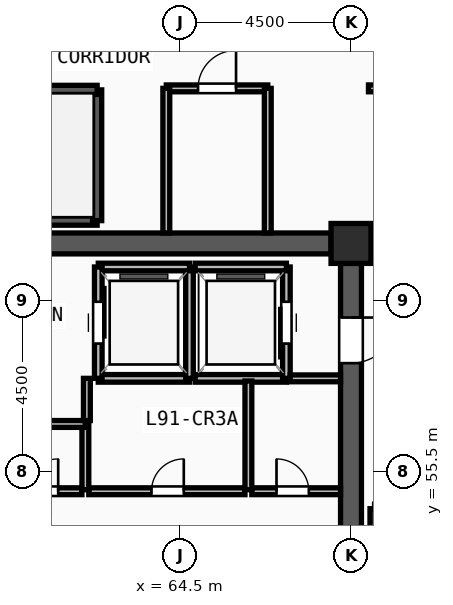
"""IFC4 building model, lengths in metres.
Left out: names, types, materials, properties, quantities, classifications, styles, units other than length and angle.
Written with IfcOpenShell. Run it as: python <this file> out.ifc"""

import sys

from ifc_helpers import new_model, si_unit, direction, frame, frame_2d, origin, origin_2d, place, context, subcontext, project, spatial, rectangle, extrude, source, transform, mapped, element, fill, save


model = new_model("IFC4")
c1 = context("Model", 3, precision=1e-05, world=origin(), true_north=direction((0.0, 1.0)))
c2 = subcontext(c1, "Body", "Model", "MODEL_VIEW")
j1 = project(units=[si_unit("LENGTHUNIT", "METRE"), si_unit("PLANEANGLEUNIT", "RADIAN")], contexts=[c1])
p1 = place(None, origin())
s1 = spatial("IfcSite", under=j1, at=p1, CompositionType="ELEMENT")
p2 = place(p1, origin())
s2 = spatial("IfcBuilding", under=s1, at=p2, CompositionType="ELEMENT")
p3 = place(p2, frame((0.0, 0.0, 351.0)))
s3 = spatial("IfcBuildingStorey", under=s2, at=p3, CompositionType="ELEMENT", Elevation=351.0)
m1 = source(origin(), c2, "Body", "SweptSolid", [
    extrude(rectangle(XDim=1.05, YDim=1.05, at=origin_2d()), origin(), (0.0, 0.0, 1.0), 4.8),
])
p4 = place(p3, frame((69.0, 61.5, 0.0), z_axis=(0.0, 0.0, 1.0), x_axis=(1.0, 0.0, 0.0)))
e1 = element("IfcColumn", 1, at=p4, inside=s3, PredefinedType="COLUMN", context=c2, shape_type="MappedRepresentation", body=[
    mapped(m1, transform((0.0, 0.0, 0.0), x_axis=(1.0, 0.0, 0.0), y_axis=(0.0, 1.0, 0.0), z_axis=(0.0, 0.0, 1.0), scale=1.0)),
])
p5 = place(p3, frame((60.525, 61.5, 0.0), z_axis=(0.0, 0.0, 1.0), x_axis=(1.0, 0.0, 0.0)))
e2 = element("IfcWall", 2, at=p5, inside=s3, PredefinedType="SHEAR", context=c2, shape_type="SweptSolid", body=[
    extrude(rectangle(XDim=7.95, YDim=0.55, at=frame_2d((3.975, 0.0))), origin(), (0.0, 0.0, 1.0), 4.52),
])
p6 = place(p3, frame((69.0, 60.975, 0.0), z_axis=(0.0, 0.0, 1.0), x_axis=(0.0, -1.0, 0.0)))
e3 = element("IfcWall", 3, at=p6, inside=s3, PredefinedType="SHEAR", context=c2, shape_type="SweptSolid", body=[
    extrude(rectangle(XDim=13.95, YDim=0.55, at=frame_2d((6.975, 0.0))), origin(), (0.0, 0.0, 1.0), 4.52),
])
m2 = source(origin(), c2, "Body", "SweptSolid", [
    extrude(rectangle(XDim=1.2, YDim=2.2, at=frame_2d((0.6, 1.1))), frame((0.0, 0.285, 0.0), z_axis=(0.0, -1.0, 0.0), x_axis=(1.0, 0.0, 0.0)), (0.0, 0.0, 1.0), 0.57),
])
p7 = place(p6, frame((1.425, 0.0, 0.0)))
e4 = element("IfcOpeningElement", 4, at=p7, cuts=e3, PredefinedType="OPENING", context=c2, shape_type="MappedRepresentation", body=[
    mapped(m2, transform((0.0, 0.0, 0.0), x_axis=(1.0, 0.0, 0.0), y_axis=(0.0, 1.0, 0.0), z_axis=(0.0, 0.0, 1.0), scale=1.0)),
])
for number, where, z_axis, x_axis in (
    (5, (69.62, 54.52, 0.0), (0.0, 0.0, 1.0), (0.0, -1.0, 0.0)),
    (6, (54.5, 62.1, 0.0), (0.0, 0.0, 1.0), (1.0, 0.0, 0.0)),
):
    element("IfcWall", number, at=place(p3, frame(where, z_axis=z_axis, x_axis=x_axis)), inside=s3, PredefinedType="SOLIDWALL", context=c2, shape_type="SweptSolid", body=[
        extrude(rectangle(XDim=7.82, YDim=0.24, at=frame_2d((3.91, 0.0))), origin(), (0.0, 0.0, 1.0), 4.52),
    ])
p8 = place(p3, frame((62.32, 62.1, 0.0), z_axis=(0.0, 0.0, 1.0), x_axis=(0.0, 1.0, 0.0)))
e7 = element("IfcWall", 7, at=p8, inside=s3, PredefinedType="SOLIDWALL", context=c2, shape_type="SweptSolid", body=[
    extrude(rectangle(XDim=3.44, YDim=0.24, at=frame_2d((1.72, 0.0))), origin(), (0.0, 0.0, 1.0), 4.52),
])
p9 = place(p3, frame((62.32, 65.54, 0.0), z_axis=(0.0, 0.0, 1.0), x_axis=(-1.0, 0.0, 0.0)))
e8 = element("IfcWall", 8, at=p9, inside=s3, PredefinedType="SOLIDWALL", context=c2, shape_type="SweptSolid", body=[
    extrude(rectangle(XDim=7.82, YDim=0.24, at=frame_2d((3.91, 0.0))), origin(), (0.0, 0.0, 1.0), 4.52),
])
m3 = source(origin(), c2, "Body", "SweptSolid", [
    extrude(rectangle(XDim=1.2, YDim=2.2, at=frame_2d((0.6, 1.1))), frame((0.0, 0.13, 0.0), z_axis=(0.0, -1.0, 0.0), x_axis=(1.0, 0.0, 0.0)), (0.0, 0.0, 1.0), 0.26),
])
p10 = place(p9, frame((6.3, 0.0, 0.0)))
e9 = element("IfcOpeningElement", 9, at=p10, cuts=e8, PredefinedType="OPENING", context=c2, shape_type="MappedRepresentation", body=[
    mapped(m3, transform((0.0, 0.0, 0.0), x_axis=(1.0, 0.0, 0.0), y_axis=(0.0, 1.0, 0.0), z_axis=(0.0, 0.0, 1.0), scale=1.0)),
])
p11 = place(p3, frame((62.35, 57.95, 0.0), z_axis=(0.0, 0.0, 1.0), x_axis=(1.0, 0.0, 0.0)))
e10 = element("IfcWall", 10, at=p11, inside=s3, PredefinedType="SOLIDWALL", context=c2, shape_type="SweptSolid", body=[
    extrude(rectangle(XDim=2.4, YDim=0.2, at=frame_2d((1.2, 0.0))), origin(), (0.0, 0.0, 1.0), 4.52),
])
p12 = place(p3, frame((64.75, 57.95, 0.0), z_axis=(0.0, 0.0, 1.0), x_axis=(0.0, 1.0, 0.0)))
e11 = element("IfcWall", 11, at=p12, inside=s3, PredefinedType="SOLIDWALL", context=c2, shape_type="SweptSolid", body=[
    extrude(rectangle(XDim=2.93, YDim=0.2, at=frame_2d((1.465, 0.0))), origin(), (0.0, 0.0, 1.0), 4.52),
])
p13 = place(p3, frame((64.75, 60.88, 0.0), z_axis=(0.0, 0.0, 1.0), x_axis=(-1.0, 0.0, 0.0)))
e12 = element("IfcWall", 12, at=p13, inside=s3, PredefinedType="SOLIDWALL", context=c2, shape_type="SweptSolid", body=[
    extrude(rectangle(XDim=2.4, YDim=0.2, at=frame_2d((1.2, 0.0))), origin(), (0.0, 0.0, 1.0), 4.52),
])
p14 = place(p3, frame((62.35, 60.88, 0.0), z_axis=(0.0, 0.0, 1.0), x_axis=(0.0, -1.0, 0.0)))
e13 = element("IfcWall", 13, at=p14, inside=s3, PredefinedType="SOLIDWALL", context=c2, shape_type="SweptSolid", body=[
    extrude(rectangle(XDim=2.93, YDim=0.2, at=frame_2d((1.465, 0.0))), origin(), (0.0, 0.0, 1.0), 4.52),
])
m4 = source(origin(), c2, "Body", "SweptSolid", [
    extrude(rectangle(XDim=1.1, YDim=2.2, at=frame_2d((0.55, 1.1))), frame((0.0, 0.11, 0.0), z_axis=(0.0, -1.0, 0.0), x_axis=(1.0, 0.0, 0.0)), (0.0, 0.0, 1.0), 0.22),
])
p15 = place(p14, frame((0.915, 0.0, 0.0)))
e14 = element("IfcOpeningElement", 14, at=p15, cuts=e13, PredefinedType="OPENING", context=c2, shape_type="MappedRepresentation", body=[
    mapped(m4, transform((0.0, 0.0, 0.0), x_axis=(1.0, 0.0, 0.0), y_axis=(0.0, 1.0, 0.0), z_axis=(0.0, 0.0, 1.0), scale=1.0)),
])
p16 = place(p3, frame((64.9, 57.95, 0.0), z_axis=(0.0, 0.0, 1.0), x_axis=(1.0, 0.0, 0.0)))
e15 = element("IfcWall", 15, at=p16, inside=s3, PredefinedType="SOLIDWALL", context=c2, shape_type="SweptSolid", body=[
    extrude(rectangle(XDim=2.4, YDim=0.2, at=frame_2d((1.2, 0.0))), origin(), (0.0, 0.0, 1.0), 4.52),
])
p17 = place(p3, frame((67.3, 57.95, 0.0), z_axis=(0.0, 0.0, 1.0), x_axis=(0.0, 1.0, 0.0)))
e16 = element("IfcWall", 16, at=p17, inside=s3, PredefinedType="SOLIDWALL", context=c2, shape_type="SweptSolid", body=[
    extrude(rectangle(XDim=2.93, YDim=0.2, at=frame_2d((1.465, 0.0))), origin(), (0.0, 0.0, 1.0), 4.52),
])
p18 = place(p17, frame((0.915, 0.0, 0.0)))
e17 = element("IfcOpeningElement", 17, at=p18, cuts=e16, PredefinedType="OPENING", context=c2, shape_type="MappedRepresentation", body=[
    mapped(m4, transform((0.0, 0.0, 0.0), x_axis=(1.0, 0.0, 0.0), y_axis=(0.0, 1.0, 0.0), z_axis=(0.0, 0.0, 1.0), scale=1.0)),
])
p19 = place(p3, frame((67.3, 60.88, 0.0), z_axis=(0.0, 0.0, 1.0), x_axis=(-1.0, 0.0, 0.0)))
e18 = element("IfcWall", 18, at=p19, inside=s3, PredefinedType="SOLIDWALL", context=c2, shape_type="SweptSolid", body=[
    extrude(rectangle(XDim=2.4, YDim=0.2, at=frame_2d((1.2, 0.0))), origin(), (0.0, 0.0, 1.0), 4.52),
])
p20 = place(p3, frame((62.1, 54.98, 0.0), z_axis=(0.0, 0.0, 1.0), x_axis=(1.0, 0.0, 0.0)))
e19 = element("IfcWall", 19, at=p20, inside=s3, PredefinedType="PARTITIONING", context=c2, shape_type="SweptSolid", body=[
    extrude(rectangle(XDim=4.11, YDim=0.18, at=frame_2d((2.055, 0.0))), origin(), (0.0, 0.0, 1.0), 4.52),
])
m5 = source(origin(), c2, "Body", "SweptSolid", [
    extrude(rectangle(XDim=0.85, YDim=2.1, at=frame_2d((0.425, 1.05))), frame((0.0, 0.1, 0.0), z_axis=(0.0, -1.0, 0.0), x_axis=(1.0, 0.0, 0.0)), (0.0, 0.0, 1.0), 0.2),
])
p21 = place(p20, frame((1.65, 0.0, 0.0)))
e20 = element("IfcOpeningElement", 20, at=p21, cuts=e19, PredefinedType="OPENING", context=c2, shape_type="MappedRepresentation", body=[
    mapped(m5, transform((0.0, 0.0, 0.0), x_axis=(1.0, 0.0, 0.0), y_axis=(0.0, 1.0, 0.0), z_axis=(0.0, 0.0, 1.0), scale=1.0)),
])
p22 = place(p3, frame((66.39, 54.98, 0.0), z_axis=(0.0, 0.0, 1.0), x_axis=(1.0, 0.0, 0.0)))
e21 = element("IfcWall", 21, at=p22, inside=s3, PredefinedType="PARTITIONING", context=c2, shape_type="SweptSolid", body=[
    extrude(rectangle(XDim=2.335, YDim=0.18, at=frame_2d((1.167, 0.0))), origin(), (0.0, 0.0, 1.0), 4.52),
])
p23 = place(p22, frame((0.65, 0.0, 0.0)))
e22 = element("IfcOpeningElement", 22, at=p23, cuts=e21, PredefinedType="OPENING", context=c2, shape_type="MappedRepresentation", body=[
    mapped(m5, transform((0.0, 0.0, 0.0), x_axis=(1.0, 0.0, 0.0), y_axis=(0.0, 1.0, 0.0), z_axis=(0.0, 0.0, 1.0), scale=1.0)),
])
p24 = place(p3, frame((59.81, 54.98, 0.0), z_axis=(0.0, 0.0, 1.0), x_axis=(1.0, 0.0, 0.0)))
e23 = element("IfcWall", 23, at=p24, inside=s3, PredefinedType="PARTITIONING", context=c2, shape_type="SweptSolid", body=[
    extrude(rectangle(XDim=2.11, YDim=0.18, at=frame_2d((1.055, 0.0))), origin(), (0.0, 0.0, 1.0), 4.52),
])
p25 = place(p24, frame((0.635, 0.0, 0.0)))
e24 = element("IfcOpeningElement", 24, at=p25, cuts=e23, PredefinedType="OPENING", context=c2, shape_type="MappedRepresentation", body=[
    mapped(m5, transform((0.0, 0.0, 0.0), x_axis=(1.0, 0.0, 0.0), y_axis=(0.0, 1.0, 0.0), z_axis=(0.0, 0.0, 1.0), scale=1.0)),
])
p26 = place(p3, frame((64.14, 65.58, 0.0), z_axis=(0.0, 0.0, 1.0), x_axis=(1.0, 0.0, 0.0)))
e25 = element("IfcWall", 25, at=p26, inside=s3, PredefinedType="PARTITIONING", context=c2, shape_type="SweptSolid", body=[
    extrude(rectangle(XDim=2.67, YDim=0.18, at=frame_2d((1.335, 0.0))), origin(), (0.0, 0.0, 1.0), 4.52),
])
m6 = source(origin(), c2, "Body", "SweptSolid", [
    extrude(rectangle(XDim=1.0, YDim=2.2, at=frame_2d((0.5, 1.1))), frame((0.0, 0.1, 0.0), z_axis=(0.0, -1.0, 0.0), x_axis=(1.0, 0.0, 0.0)), (0.0, 0.0, 1.0), 0.2),
])
p27 = place(p26, frame((0.835, 0.0, 0.0)))
e26 = element("IfcOpeningElement", 26, at=p27, cuts=e25, PredefinedType="OPENING", context=c2, shape_type="MappedRepresentation", body=[
    mapped(m6, transform((0.0, 0.0, 0.0), x_axis=(1.0, 0.0, 0.0), y_axis=(0.0, 1.0, 0.0), z_axis=(0.0, 0.0, 1.0), scale=1.0)),
])
p28 = place(p3, frame((69.46, 65.58, 0.0), z_axis=(0.0, 0.0, 1.0), x_axis=(1.0, 0.0, 0.0)))
e27 = element("IfcWall", 27, at=p28, inside=s3, PredefinedType="PARTITIONING", context=c2, shape_type="SweptSolid", body=[
    extrude(rectangle(XDim=3.84, YDim=0.18, at=frame_2d((1.92, 0.0))), origin(), (0.0, 0.0, 1.0), 4.52),
])
m7 = source(origin(), c2, "Body", "SweptSolid", [
    extrude(rectangle(XDim=1.3, YDim=2.2, at=frame_2d((0.65, 1.1))), frame((0.0, 0.1, 0.0), z_axis=(0.0, -1.0, 0.0), x_axis=(1.0, 0.0, 0.0)), (0.0, 0.0, 1.0), 0.2),
])
p29 = place(p28, frame((1.27, 0.0, 0.0)))
e28 = element("IfcOpeningElement", 28, at=p29, cuts=e27, PredefinedType="OPENING", context=c2, shape_type="MappedRepresentation", body=[
    mapped(m7, transform((0.0, 0.0, 0.0), x_axis=(1.0, 0.0, 0.0), y_axis=(0.0, 1.0, 0.0), z_axis=(0.0, 0.0, 1.0), scale=1.0)),
])
p30 = place(p3, frame((66.3, 55.02, 0.0), z_axis=(0.0, 0.0, 1.0), x_axis=(0.0, 1.0, 0.0)))
e29 = element("IfcWall", 29, at=p30, inside=s3, PredefinedType="PARTITIONING", context=c2, shape_type="SweptSolid", body=[
    extrude(rectangle(XDim=2.86, YDim=0.18, at=frame_2d((1.43, 0.0))), origin(), (0.0, 0.0, 1.0), 4.52),
])
p31 = place(p3, frame((62.01, 55.02, 0.0), z_axis=(0.0, 0.0, 1.0), x_axis=(0.0, 1.0, 0.0)))
e30 = element("IfcWall", 30, at=p31, inside=s3, PredefinedType="PARTITIONING", context=c2, shape_type="SweptSolid", body=[
    extrude(rectangle(XDim=1.73, YDim=0.18, at=frame_2d((0.865, 0.0))), origin(), (0.0, 0.0, 1.0), 4.52),
])
p32 = place(p3, frame((59.72, 56.75, 0.0), z_axis=(0.0, 0.0, 1.0), x_axis=(1.0, 0.0, 0.0)))
e31 = element("IfcWall", 31, at=p32, inside=s3, PredefinedType="PARTITIONING", context=c2, shape_type="SweptSolid", body=[
    extrude(rectangle(XDim=2.29, YDim=0.18, at=frame_2d((1.145, 0.0))), origin(), (0.0, 0.0, 1.0), 4.52),
])
for number, where, z_axis, x_axis in (
    (32, (64.14, 61.775, 0.0), (0.0, 0.0, 1.0), (0.0, 1.0, 0.0)),
    (33, (66.81, 61.775, 0.0), (0.0, 0.0, 1.0), (0.0, 1.0, 0.0)),
):
    element("IfcWall", number, at=place(p3, frame(where, z_axis=z_axis, x_axis=x_axis)), inside=s3, PredefinedType="PARTITIONING", context=c2, shape_type="SweptSolid", body=[
        extrude(rectangle(XDim=3.805, YDim=0.18, at=frame_2d((1.903, 0.0))), origin(), (0.0, 0.0, 1.0), 4.52),
    ])
p33 = place(p3, frame((62.05, 56.84, 0.0), z_axis=(0.0, 0.0, 1.0), x_axis=(0.0, 1.0, 0.0)))
e34 = element("IfcWall", 34, at=p33, inside=s3, PredefinedType="PARTITIONING", context=c2, shape_type="SweptSolid", body=[
    extrude(rectangle(XDim=1.11, YDim=0.18, at=frame_2d((0.555, 0.0))), origin(), (0.0, 0.0, 1.0), 4.52),
])
p34 = place(p3, frame((67.4, 57.95, 0.0), z_axis=(0.0, 0.0, 1.0), x_axis=(1.0, 0.0, 0.0)))
e35 = element("IfcWall", 35, at=p34, inside=s3, PredefinedType="PARTITIONING", context=c2, shape_type="SweptSolid", body=[
    extrude(rectangle(XDim=1.325, YDim=0.18, at=frame_2d((0.663, 0.0))), origin(), (0.0, 0.0, 1.0), 4.52),
])
m8 = source(origin(), c2, "Body", "SweptSolid", [
    extrude(rectangle(XDim=1.2, YDim=2.2, at=frame_2d((0.6, 1.1))), frame((0.0, 0.025, 0.0), z_axis=(0.0, -1.0, 0.0), x_axis=(1.0, 0.0, 0.0)), (0.0, 0.0, 1.0), 0.05),
])
p35 = place(p7, origin())
e36 = element("IfcDoor", 36, at=p35, inside=s3, OperationType="SINGLE_SWING_LEFT", PredefinedType="DOOR", context=c2, shape_type="MappedRepresentation", body=[
    mapped(m8, transform((0.0, 0.0, 0.0), x_axis=(1.0, 0.0, 0.0), y_axis=(0.0, 1.0, 0.0), z_axis=(0.0, 0.0, 1.0), scale=1.0)),
])
fill(e4, e36)
m9 = source(origin(), c2, "Body", "SweptSolid", [
    extrude(rectangle(XDim=1.1, YDim=2.2, at=frame_2d((0.55, 1.1))), frame((0.0, 0.025, 0.0), z_axis=(0.0, -1.0, 0.0), x_axis=(1.0, 0.0, 0.0)), (0.0, 0.0, 1.0), 0.05),
])
p36 = place(p15, origin())
e37 = element("IfcDoor", 37, at=p36, inside=s3, OperationType="SLIDING_TO_LEFT", PredefinedType="DOOR", context=c2, shape_type="MappedRepresentation", body=[
    mapped(m9, transform((0.0, 0.0, 0.0), x_axis=(1.0, 0.0, 0.0), y_axis=(0.0, 1.0, 0.0), z_axis=(0.0, 0.0, 1.0), scale=1.0)),
])
fill(e14, e37)
p37 = place(p18, origin())
e38 = element("IfcDoor", 38, at=p37, inside=s3, OperationType="SLIDING_TO_LEFT", PredefinedType="DOOR", context=c2, shape_type="MappedRepresentation", body=[
    mapped(m9, transform((0.0, 0.0, 0.0), x_axis=(1.0, 0.0, 0.0), y_axis=(0.0, 1.0, 0.0), z_axis=(0.0, 0.0, 1.0), scale=1.0)),
])
fill(e17, e38)
m10 = source(origin(), c2, "Body", "SweptSolid", [
    extrude(rectangle(XDim=0.85, YDim=2.1, at=frame_2d((0.425, 1.05))), frame((0.0, 0.025, 0.0), z_axis=(0.0, -1.0, 0.0), x_axis=(1.0, 0.0, 0.0)), (0.0, 0.0, 1.0), 0.05),
])
p38 = place(p21, origin())
e39 = element("IfcDoor", 39, at=p38, inside=s3, OperationType="SINGLE_SWING_RIGHT", PredefinedType="DOOR", context=c2, shape_type="MappedRepresentation", body=[
    mapped(m10, transform((0.0, 0.0, 0.0), x_axis=(1.0, 0.0, 0.0), y_axis=(0.0, 1.0, 0.0), z_axis=(0.0, 0.0, 1.0), scale=1.0)),
])
fill(e20, e39)
p39 = place(p23, origin())
e40 = element("IfcDoor", 40, at=p39, inside=s3, OperationType="SINGLE_SWING_LEFT", PredefinedType="DOOR", context=c2, shape_type="MappedRepresentation", body=[
    mapped(m10, transform((0.0, 0.0, 0.0), x_axis=(1.0, 0.0, 0.0), y_axis=(0.0, 1.0, 0.0), z_axis=(0.0, 0.0, 1.0), scale=1.0)),
])
fill(e22, e40)
p40 = place(p25, origin())
e41 = element("IfcDoor", 41, at=p40, inside=s3, OperationType="SINGLE_SWING_RIGHT", PredefinedType="DOOR", context=c2, shape_type="MappedRepresentation", body=[
    mapped(m10, transform((0.0, 0.0, 0.0), x_axis=(1.0, 0.0, 0.0), y_axis=(0.0, 1.0, 0.0), z_axis=(0.0, 0.0, 1.0), scale=1.0)),
])
fill(e24, e41)
m11 = source(origin(), c2, "Body", "SweptSolid", [
    extrude(rectangle(XDim=1.0, YDim=2.2, at=frame_2d((0.5, 1.1))), frame((0.0, 0.025, 0.0), z_axis=(0.0, -1.0, 0.0), x_axis=(1.0, 0.0, 0.0)), (0.0, 0.0, 1.0), 0.05),
])
p41 = place(p27, origin())
e42 = element("IfcDoor", 42, at=p41, inside=s3, OperationType="SINGLE_SWING_RIGHT", PredefinedType="DOOR", context=c2, shape_type="MappedRepresentation", body=[
    mapped(m11, transform((0.0, 0.0, 0.0), x_axis=(1.0, 0.0, 0.0), y_axis=(0.0, 1.0, 0.0), z_axis=(0.0, 0.0, 1.0), scale=1.0)),
])
fill(e26, e42)
save(model, sys.argv[1])
